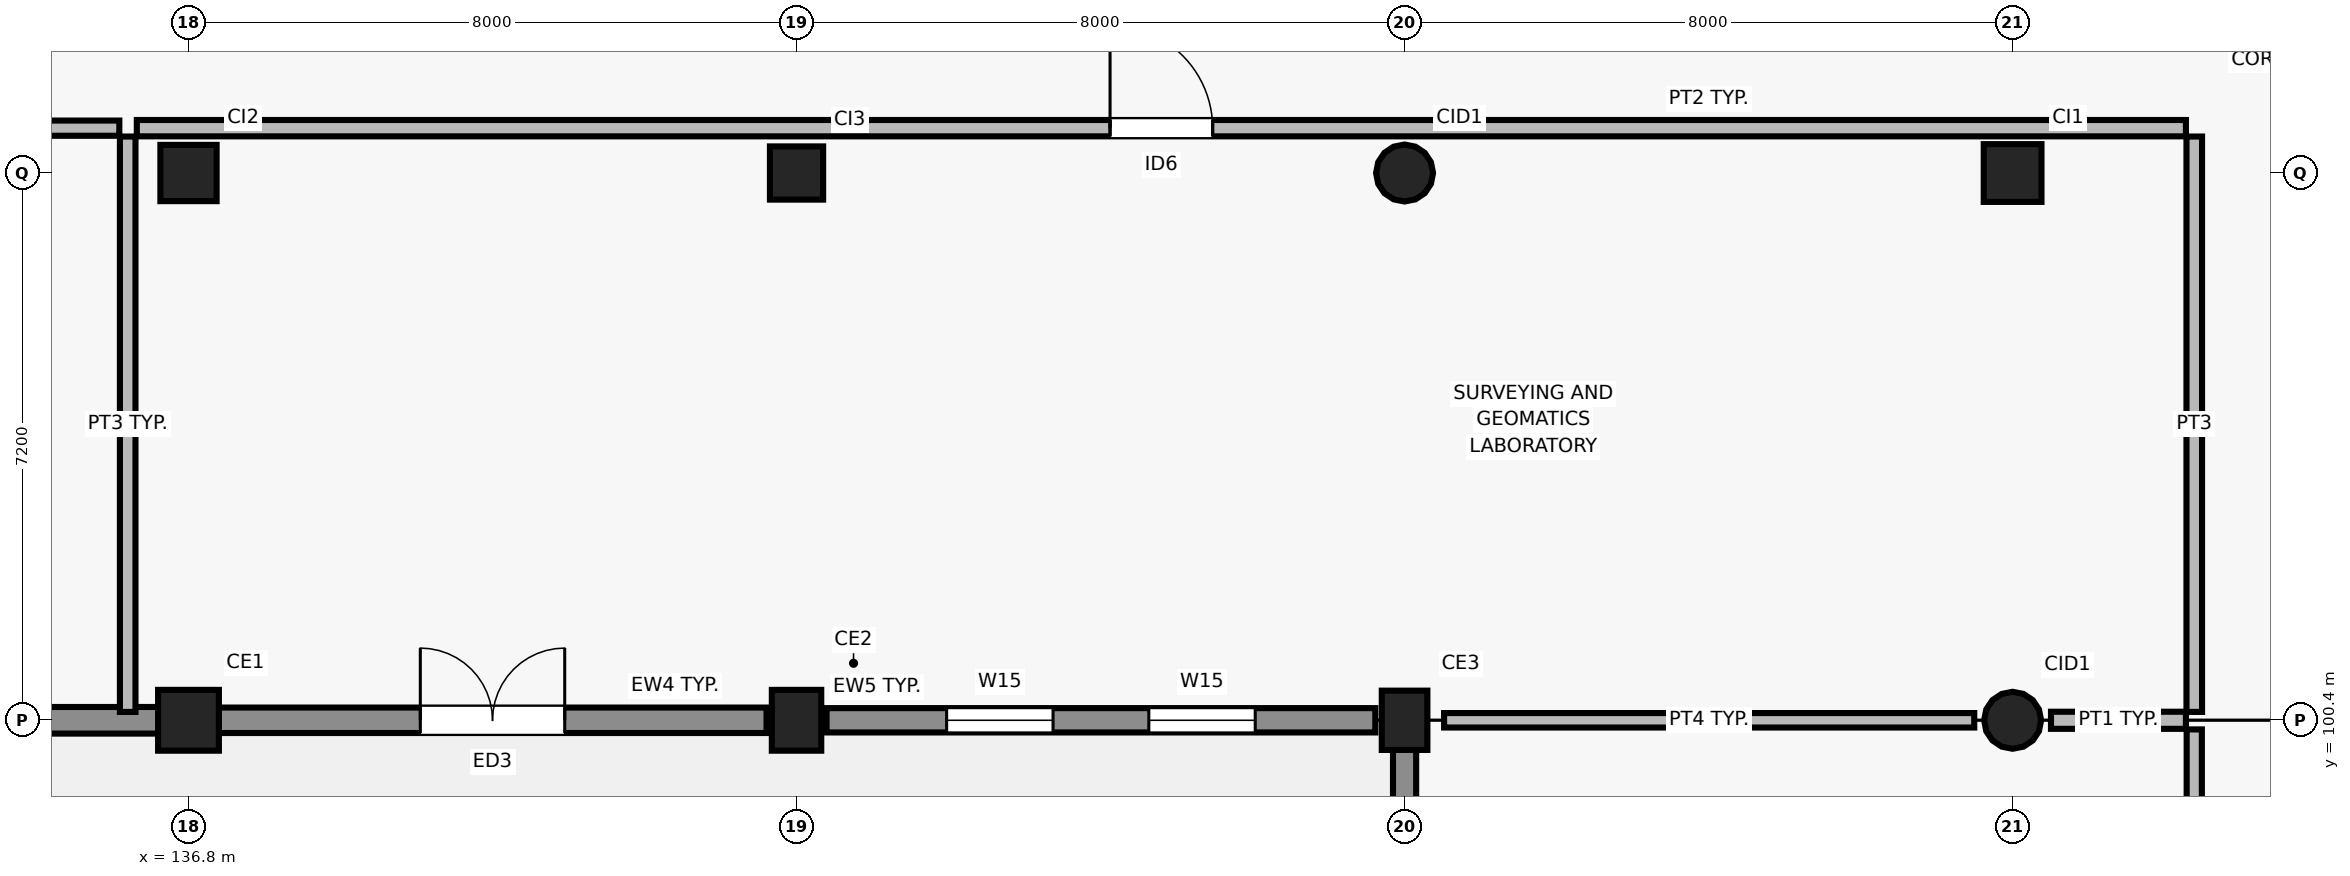
"""IFC4 building model, lengths in metres.
Left out: names, types, materials, properties, quantities, classifications, styles, units other than length and angle.
Written with IfcOpenShell. Run it as: python <this file> out.ifc"""

import sys

from ifc_helpers import new_model, si_unit, direction, frame, frame_2d, origin, origin_2d, place, context, subcontext, project, spatial, rectangle, circle, extrude, element, fill, save


model = new_model("IFC4")
c1 = context("Model", 3, precision=1e-05, world=origin(), true_north=direction((0.0, 1.0)))
c2 = subcontext(c1, "Body", "Model", "MODEL_VIEW")
j1 = project(units=[si_unit("LENGTHUNIT", "METRE"), si_unit("PLANEANGLEUNIT", "RADIAN")], contexts=[c1])
p1 = place(None, origin())
s1 = spatial("IfcSite", under=j1, at=p1, CompositionType="ELEMENT")
p2 = place(p1, origin())
s2 = spatial("IfcBuilding", under=s1, at=p2, CompositionType="ELEMENT")
p3 = place(p2, origin())
s3 = spatial("IfcBuildingStorey", under=s2, at=p3, CompositionType="ELEMENT", Elevation=0.0)
p4 = place(p3, frame((136.8, 100.4, 0.0), z_axis=(0.0, 0.0, 1.0), x_axis=(1.0, 0.0, 0.0)))
e1 = element("IfcColumn", 1, at=p4, inside=s3, PredefinedType="COLUMN", context=c2, shape_type="SweptSolid", body=[
    extrude(rectangle(XDim=0.8, YDim=0.8, at=origin_2d()), origin(), (0.0, 0.0, 1.0), 4.5),
])
p5 = place(p3, frame((136.8, 107.6, 0.0), z_axis=(0.0, 0.0, 1.0), x_axis=(1.0, 0.0, 0.0)))
e2 = element("IfcColumn", 2, at=p5, inside=s3, PredefinedType="COLUMN", context=c2, shape_type="SweptSolid", body=[
    extrude(rectangle(XDim=0.74, YDim=0.74, at=origin_2d()), origin(), (0.0, 0.0, 1.0), 4.5),
])
p6 = place(p3, frame((144.8, 100.4, 0.0), z_axis=(0.0, 0.0, 1.0), x_axis=(1.0, 0.0, 0.0)))
e3 = element("IfcColumn", 3, at=p6, inside=s3, PredefinedType="COLUMN", context=c2, shape_type="SweptSolid", body=[
    extrude(rectangle(XDim=0.8, YDim=0.65, at=origin_2d()), origin(), (0.0, 0.0, 1.0), 4.5),
])
p7 = place(p3, frame((144.8, 107.6, 0.0), z_axis=(0.0, 0.0, 1.0), x_axis=(1.0, 0.0, 0.0)))
e4 = element("IfcColumn", 4, at=p7, inside=s3, PredefinedType="COLUMN", context=c2, shape_type="SweptSolid", body=[
    extrude(rectangle(XDim=0.7, YDim=0.7, at=origin_2d()), origin(), (0.0, 0.0, 1.0), 4.5),
])
p8 = place(p3, frame((152.8, 100.4, 0.0), z_axis=(0.0, 0.0, 1.0), x_axis=(1.0, 0.0, 0.0)))
e5 = element("IfcColumn", 5, at=p8, inside=s3, PredefinedType="COLUMN", context=c2, shape_type="SweptSolid", body=[
    extrude(rectangle(XDim=0.78, YDim=0.6, at=origin_2d()), origin(), (0.0, 0.0, 1.0), 4.5),
])
for number, where, z_axis, x_axis in (
    (6, (152.8, 107.6, 0.0), (0.0, 0.0, 1.0), (1.0, 0.0, 0.0)),
    (7, (160.8, 100.4, 0.0), (0.0, 0.0, 1.0), (1.0, 0.0, 0.0)),
):
    element("IfcColumn", number, at=place(p3, frame(where, z_axis=z_axis, x_axis=x_axis)), inside=s3, PredefinedType="COLUMN", context=c2, shape_type="SweptSolid", body=[
        extrude(circle(Radius=0.375, at=origin_2d()), origin(), (0.0, 0.0, 1.0), 4.5),
    ])
p9 = place(p3, frame((160.8, 107.6, 0.0), z_axis=(0.0, 0.0, 1.0), x_axis=(1.0, 0.0, 0.0)))
e8 = element("IfcColumn", 8, at=p9, inside=s3, PredefinedType="COLUMN", context=c2, shape_type="SweptSolid", body=[
    extrude(rectangle(XDim=0.76, YDim=0.76, at=origin_2d()), origin(), (0.0, 0.0, 1.0), 4.5),
])
p10 = place(p3, frame((129.136, 100.4, 0.0), z_axis=(0.0, 0.0, 1.0), x_axis=(1.0, 0.0, 0.0)))
e9 = element("IfcWall", 9, at=p10, inside=s3, PredefinedType="SOLIDWALL", context=c2, shape_type="SweptSolid", body=[
    extrude(rectangle(XDim=7.269, YDim=0.35, at=frame_2d((3.635, 0.0))), origin(), (0.0, 0.0, 1.0), 3.54),
])
p11 = place(p10, frame((2.635, 0.0, 0.0)))
e10 = element("IfcOpeningElement", 10, at=p11, cuts=e9, PredefinedType="OPENING", context=c2, shape_type="SweptSolid", body=[
    extrude(rectangle(XDim=2.0, YDim=2.4, at=frame_2d((1.0, 1.2))), frame((0.0, 0.185, 0.0), z_axis=(0.0, -1.0, 0.0), x_axis=(1.0, 0.0, 0.0)), (0.0, 0.0, 1.0), 0.37),
])
p12 = place(p3, frame((137.195, 100.4, 0.0), z_axis=(0.0, 0.0, 1.0), x_axis=(1.0, 0.0, 0.0)))
e11 = element("IfcWall", 11, at=p12, inside=s3, PredefinedType="SOLIDWALL", context=c2, shape_type="SweptSolid", body=[
    extrude(rectangle(XDim=7.21, YDim=0.335, at=frame_2d((3.605, 0.0))), origin(), (0.0, 0.0, 1.0), 3.62),
])
p13 = place(p12, frame((2.655, 0.0, 0.0)))
e12 = element("IfcOpeningElement", 12, at=p13, cuts=e11, PredefinedType="OPENING", context=c2, shape_type="SweptSolid", body=[
    extrude(rectangle(XDim=1.9, YDim=2.35, at=frame_2d((0.95, 1.175))), frame((0.0, 0.177, 0.0), z_axis=(0.0, -1.0, 0.0), x_axis=(1.0, 0.0, 0.0)), (0.0, 0.0, 1.0), 0.355),
])
p14 = place(p3, frame((145.195, 100.4, 0.0), z_axis=(0.0, 0.0, 1.0), x_axis=(1.0, 0.0, 0.0)))
e13 = element("IfcWall", 13, at=p14, inside=s3, PredefinedType="SOLIDWALL", context=c2, shape_type="SweptSolid", body=[
    extrude(rectangle(XDim=7.22, YDim=0.32, at=frame_2d((3.61, 0.0))), origin(), (0.0, 0.0, 1.0), 3.54),
])
p15 = place(p14, frame((1.58, 0.0, 0.9)))
e14 = element("IfcOpeningElement", 14, at=p15, cuts=e13, PredefinedType="OPENING", context=c2, shape_type="SweptSolid", body=[
    extrude(rectangle(XDim=1.4, YDim=1.5, at=frame_2d((0.7, 0.75))), frame((0.0, 0.17, 0.0), z_axis=(0.0, -1.0, 0.0), x_axis=(1.0, 0.0, 0.0)), (0.0, 0.0, 1.0), 0.34),
])
p16 = place(p14, frame((4.24, 0.0, 0.9)))
e15 = element("IfcOpeningElement", 15, at=p16, cuts=e13, PredefinedType="OPENING", context=c2, shape_type="SweptSolid", body=[
    extrude(rectangle(XDim=1.4, YDim=1.5, at=frame_2d((0.7, 0.75))), frame((0.0, 0.17, 0.0), z_axis=(0.0, -1.0, 0.0), x_axis=(1.0, 0.0, 0.0)), (0.0, 0.0, 1.0), 0.34),
])
p17 = place(p3, frame((152.8, 100.105, 0.0), z_axis=(0.0, 0.0, 1.0), x_axis=(0.0, -1.0, 0.0)))
e16 = element("IfcWall", 16, at=p17, inside=s3, PredefinedType="SOLIDWALL", context=c2, shape_type="SweptSolid", body=[
    extrude(rectangle(XDim=6.585, YDim=0.305, at=frame_2d((3.292, 0.0))), origin(), (0.0, 0.0, 1.0), 3.64),
])
p18 = place(p17, frame((2.093, 0.0, 0.9)))
e17 = element("IfcOpeningElement", 17, at=p18, cuts=e16, PredefinedType="OPENING", context=c2, shape_type="SweptSolid", body=[
    extrude(rectangle(XDim=2.4, YDim=1.25, at=frame_2d((1.2, 0.625))), frame((0.0, 0.162, 0.0), z_axis=(0.0, -1.0, 0.0), x_axis=(1.0, 0.0, 0.0)), (0.0, 0.0, 1.0), 0.325),
])
p19 = place(p3, frame((120.8, 108.19, 0.0), z_axis=(0.0, 0.0, 1.0), x_axis=(1.0, 0.0, 0.0)))
e18 = element("IfcWall", 18, at=p19, inside=s3, PredefinedType="SOLIDWALL", context=c2, shape_type="SweptSolid", body=[
    extrude(rectangle(XDim=15.09, YDim=0.2, at=frame_2d((7.545, 0.0))), origin(), (0.0, 0.0, 1.0), 4.2),
])
p20 = place(p3, frame((136.0, 100.51, 0.0), z_axis=(0.0, 0.0, 1.0), x_axis=(0.0, 1.0, 0.0)))
e19 = element("IfcWall", 19, at=p20, inside=s3, PredefinedType="PARTITIONING", context=c2, shape_type="SweptSolid", body=[
    extrude(rectangle(XDim=7.57, YDim=0.205, at=frame_2d((3.785, 0.0))), origin(), (0.0, 0.0, 1.0), 4.2),
])
p21 = place(p3, frame((153.32, 100.4, 0.0), z_axis=(0.0, 0.0, 1.0), x_axis=(1.0, 0.0, 0.0)))
e20 = element("IfcWall", 20, at=p21, inside=s3, PredefinedType="PARTITIONING", context=c2, shape_type="SweptSolid", body=[
    extrude(rectangle(XDim=6.975, YDim=0.19, at=frame_2d((3.487, 0.0))), origin(), (0.0, 0.0, 1.0), 3.62),
])
p22 = place(p3, frame((161.305, 100.4, 0.0), z_axis=(0.0, 0.0, 1.0), x_axis=(1.0, 0.0, 0.0)))
e21 = element("IfcWall", 21, at=p22, inside=s3, PredefinedType="PARTITIONING", context=c2, shape_type="SweptSolid", body=[
    extrude(rectangle(XDim=1.775, YDim=0.225, at=frame_2d((0.888, 0.0))), origin(), (0.0, 0.0, 1.0), 3.67),
])
p23 = place(p3, frame((136.12, 108.19, 0.0), z_axis=(0.0, 0.0, 1.0), x_axis=(1.0, 0.0, 0.0)))
e22 = element("IfcWall", 22, at=p23, inside=s3, PredefinedType="PARTITIONING", context=c2, shape_type="SweptSolid", body=[
    extrude(rectangle(XDim=26.96, YDim=0.215, at=frame_2d((13.48, 0.0))), origin(), (0.0, 0.0, 1.0), 4.2),
])
p24 = place(p23, frame((12.805, 0.0, 0.0)))
e23 = element("IfcOpeningElement", 23, at=p24, cuts=e22, PredefinedType="OPENING", context=c2, shape_type="SweptSolid", body=[
    extrude(rectangle(XDim=1.35, YDim=2.2, at=frame_2d((0.675, 1.1))), frame((0.0, 0.117, 0.0), z_axis=(0.0, -1.0, 0.0), x_axis=(1.0, 0.0, 0.0)), (0.0, 0.0, 1.0), 0.235),
])
p25 = place(p3, frame((163.19, 100.51, 0.0), z_axis=(0.0, 0.0, 1.0), x_axis=(0.0, 1.0, 0.0)))
e24 = element("IfcWall", 24, at=p25, inside=s3, PredefinedType="PARTITIONING", context=c2, shape_type="SweptSolid", body=[
    extrude(rectangle(XDim=7.57, YDim=0.205, at=frame_2d((3.785, 0.0))), origin(), (0.0, 0.0, 1.0), 4.2),
])
p26 = place(p3, frame((163.19, 68.12, 0.0), z_axis=(0.0, 0.0, 1.0), x_axis=(0.0, 1.0, 0.0)))
e25 = element("IfcWall", 25, at=p26, inside=s3, PredefinedType="SOLIDWALL", context=c2, shape_type="SweptSolid", body=[
    extrude(rectangle(XDim=32.16, YDim=0.2, at=frame_2d((16.08, 0.0))), origin(), (0.0, 0.0, 1.0), 4.2),
])
p27 = place(p26, frame((15.405, 0.0, 0.0)))
e26 = element("IfcOpeningElement", 26, at=p27, cuts=e25, PredefinedType="OPENING", context=c2, shape_type="SweptSolid", body=[
    extrude(rectangle(XDim=1.35, YDim=2.2, at=frame_2d((0.675, 1.1))), frame((0.0, 0.11, 0.0), z_axis=(0.0, -1.0, 0.0), x_axis=(1.0, 0.0, 0.0)), (0.0, 0.0, 1.0), 0.22),
])
p28 = place(p13, frame((1.9, 0.0, 0.0), z_axis=(0.0, 0.0, 1.0), x_axis=(-1.0, 0.0, 0.0)))
e27 = element("IfcDoor", 27, at=p28, inside=s3, OperationType="DOUBLE_DOOR_SINGLE_SWING", PredefinedType="DOOR", context=c2, shape_type="SweptSolid", body=[
    extrude(rectangle(XDim=1.9, YDim=2.35, at=frame_2d((0.95, 1.175))), frame((0.0, 0.025, 0.0), z_axis=(0.0, -1.0, 0.0), x_axis=(1.0, 0.0, 0.0)), (0.0, 0.0, 1.0), 0.05),
])
fill(e12, e27)
p29 = place(p15, origin())
e28 = element("IfcWindow", 28, at=p29, inside=s3, PartitioningType="SINGLE_PANEL", PredefinedType="WINDOW", context=c2, shape_type="SweptSolid", body=[
    extrude(rectangle(XDim=1.4, YDim=1.5, at=frame_2d((0.7, 0.75))), frame((0.0, 0.03, 0.0), z_axis=(0.0, -1.0, 0.0), x_axis=(1.0, 0.0, 0.0)), (0.0, 0.0, 1.0), 0.06),
])
fill(e14, e28)
p30 = place(p16, origin())
e29 = element("IfcWindow", 29, at=p30, inside=s3, PartitioningType="SINGLE_PANEL", PredefinedType="WINDOW", context=c2, shape_type="SweptSolid", body=[
    extrude(rectangle(XDim=1.4, YDim=1.5, at=frame_2d((0.7, 0.75))), frame((0.0, 0.03, 0.0), z_axis=(0.0, -1.0, 0.0), x_axis=(1.0, 0.0, 0.0)), (0.0, 0.0, 1.0), 0.06),
])
fill(e15, e29)
p31 = place(p24, origin())
e30 = element("IfcDoor", 30, at=p31, inside=s3, OperationType="SINGLE_SWING_LEFT", PredefinedType="DOOR", context=c2, shape_type="SweptSolid", body=[
    extrude(rectangle(XDim=1.35, YDim=2.2, at=frame_2d((0.675, 1.1))), frame((0.0, 0.025, 0.0), z_axis=(0.0, -1.0, 0.0), x_axis=(1.0, 0.0, 0.0)), (0.0, 0.0, 1.0), 0.05),
])
fill(e23, e30)
save(model, sys.argv[1])
